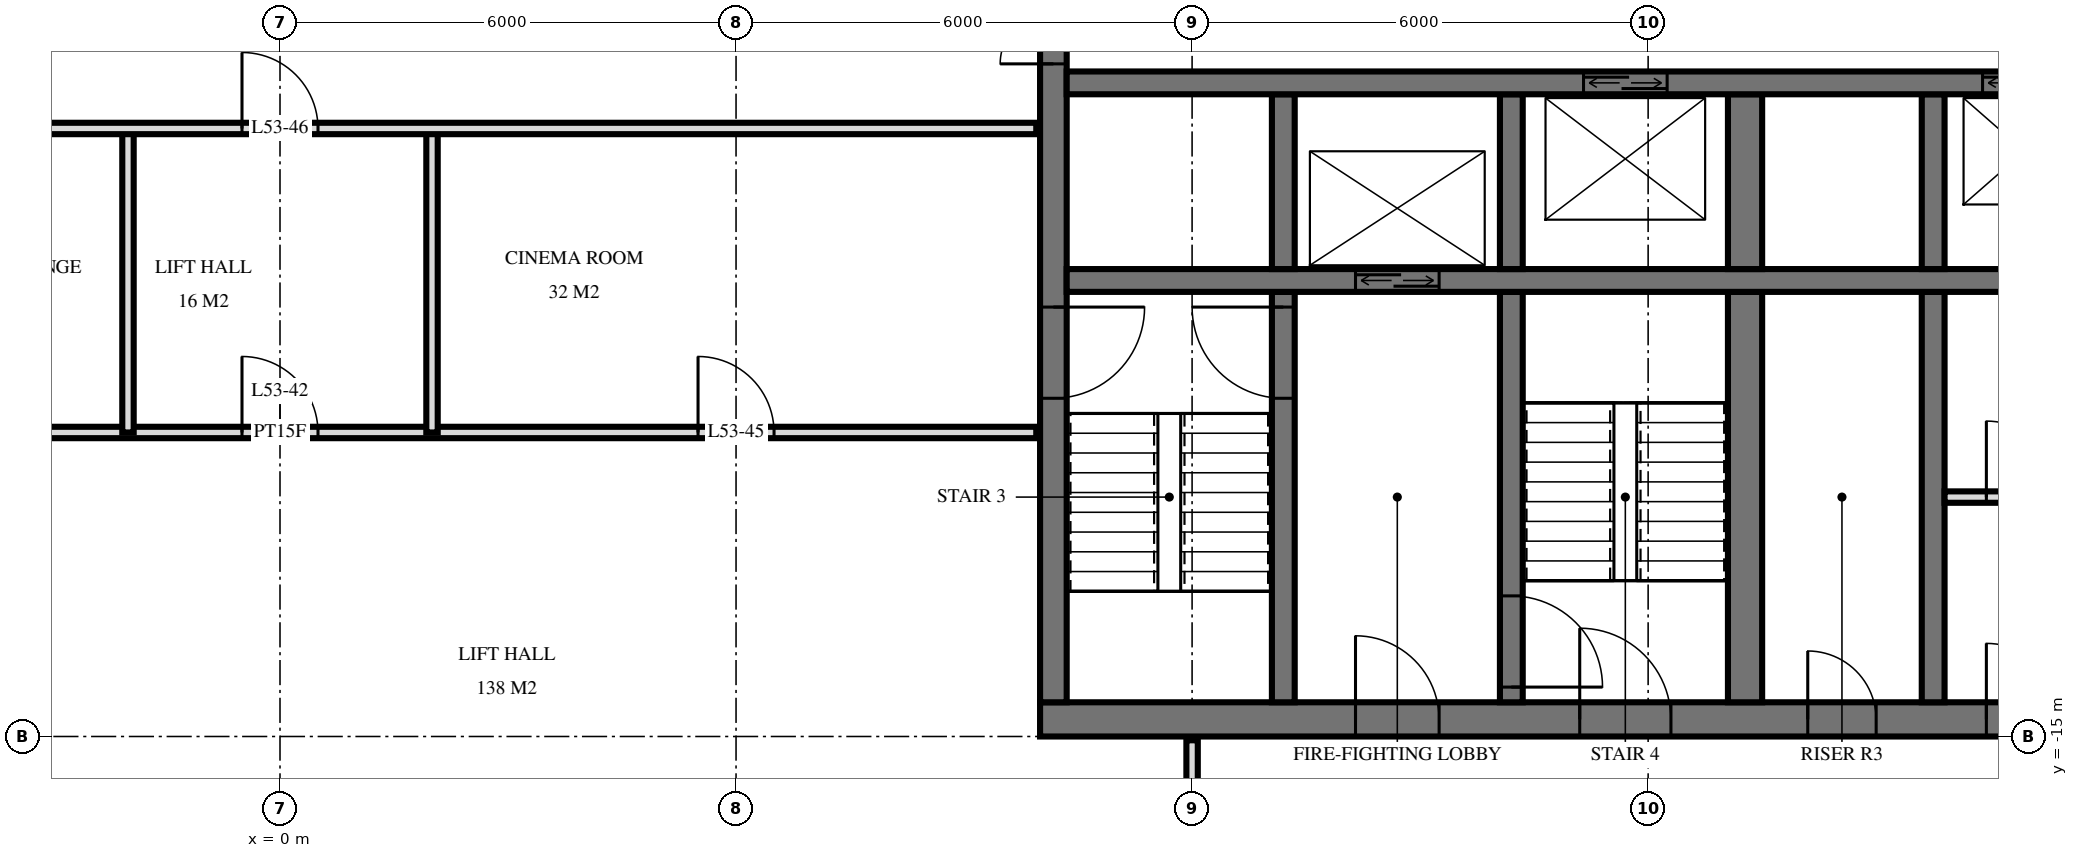
"""IFC4 building model, lengths in metres.
Left out: names, types, materials, properties, quantities, classifications, styles, units other than length and angle.
Written with IfcOpenShell. Run it as: python <this file> out.ifc"""

import sys

from ifc_helpers import new_model, si_unit, direction, frame, frame_2d, origin, place, context, subcontext, project, spatial, rectangle, extrude, element, fill, save


model = new_model("IFC4")
c1 = context("Model", 3, precision=1e-05, world=origin(), true_north=direction((0.0, 1.0)))
c2 = subcontext(c1, "Body", "Model", "MODEL_VIEW")
j1 = project(units=[si_unit("LENGTHUNIT", "METRE"), si_unit("PLANEANGLEUNIT", "RADIAN")], contexts=[c1])
p1 = place(None, origin())
s1 = spatial("IfcSite", under=j1, at=p1, CompositionType="ELEMENT")
p2 = place(p1, origin())
s2 = spatial("IfcBuilding", under=s1, at=p2, CompositionType="ELEMENT")
p3 = place(p2, frame((0.0, 0.0, 204.6)))
s3 = spatial("IfcBuildingStorey", under=s2, at=p3, CompositionType="ELEMENT", Elevation=204.6)
p4 = place(p3, frame((10.0, -14.775, 0.0), z_axis=(0.0, 0.0, 1.0), x_axis=(1.0, 0.0, 0.0)))
e1 = element("IfcWall", 1, at=p4, inside=s3, PredefinedType="SHEAR", context=c2, shape_type="SweptSolid", body=[
    extrude(rectangle(XDim=14.5, YDim=0.45, at=frame_2d((7.25, 0.0))), origin(), (0.0, 0.0, 1.0), 3.5),
])
p5 = place(p4, frame((7.1, 0.0, 0.0)))
e2 = element("IfcOpeningElement", 2, at=p5, cuts=e1, PredefinedType="OPENING", context=c2, shape_type="SweptSolid", body=[
    extrude(rectangle(XDim=1.2, YDim=2.1, at=frame_2d((0.6, 1.05))), frame((0.0, 0.235, 0.0), z_axis=(0.0, -1.0, 0.0), x_axis=(1.0, 0.0, 0.0)), (0.0, 0.0, 1.0), 0.47),
])
p6 = place(p4, frame((4.15, 0.0, 0.0)))
e3 = element("IfcOpeningElement", 3, at=p6, cuts=e1, PredefinedType="OPENING", context=c2, shape_type="SweptSolid", body=[
    extrude(rectangle(XDim=1.1, YDim=2.1, at=frame_2d((0.55, 1.05))), frame((0.0, 0.235, 0.0), z_axis=(0.0, -1.0, 0.0), x_axis=(1.0, 0.0, 0.0)), (0.0, 0.0, 1.0), 0.47),
])
p7 = place(p4, frame((10.1, 0.0, 0.0)))
e4 = element("IfcOpeningElement", 4, at=p7, cuts=e1, PredefinedType="OPENING", context=c2, shape_type="SweptSolid", body=[
    extrude(rectangle(XDim=0.9, YDim=2.1, at=frame_2d((0.45, 1.05))), frame((0.0, 0.235, 0.0), z_axis=(0.0, -1.0, 0.0), x_axis=(1.0, 0.0, 0.0)), (0.0, 0.0, 1.0), 0.47),
])
p8 = place(p4, frame((12.45, 0.0, 0.0)))
e5 = element("IfcOpeningElement", 5, at=p8, cuts=e1, PredefinedType="OPENING", context=c2, shape_type="SweptSolid", body=[
    extrude(rectangle(XDim=1.0, YDim=2.1, at=frame_2d((0.5, 1.05))), frame((0.0, 0.235, 0.0), z_axis=(0.0, -1.0, 0.0), x_axis=(1.0, 0.0, 0.0)), (0.0, 0.0, 1.0), 0.47),
])
p9 = place(p3, frame((10.175, -14.55, 0.0), z_axis=(0.0, 0.0, 1.0), x_axis=(0.0, 1.0, 0.0)))
e6 = element("IfcWall", 6, at=p9, inside=s3, PredefinedType="SHEAR", context=c2, shape_type="SweptSolid", body=[
    extrude(rectangle(XDim=14.1, YDim=0.35, at=frame_2d((7.05, 0.0))), origin(), (0.0, 0.0, 1.0), 3.5),
])
p10 = place(p9, frame((8.4, 0.0, 0.0)))
e7 = element("IfcOpeningElement", 7, at=p10, cuts=e6, PredefinedType="OPENING", context=c2, shape_type="SweptSolid", body=[
    extrude(rectangle(XDim=1.4, YDim=2.4, at=frame_2d((0.7, 1.2))), frame((0.0, 0.185, 0.0), z_axis=(0.0, -1.0, 0.0), x_axis=(1.0, 0.0, 0.0)), (0.0, 0.0, 1.0), 0.37),
])
p11 = place(p9, frame((10.0, 0.0, 0.0)))
e8 = element("IfcOpeningElement", 8, at=p11, cuts=e6, PredefinedType="OPENING", context=c2, shape_type="SweptSolid", body=[
    extrude(rectangle(XDim=1.4, YDim=2.4, at=frame_2d((0.7, 1.2))), frame((0.0, 0.185, 0.0), z_axis=(0.0, -1.0, 0.0), x_axis=(1.0, 0.0, 0.0)), (0.0, 0.0, 1.0), 0.37),
])
p12 = place(p9, frame((4.0, 0.0, 0.0)))
e9 = element("IfcOpeningElement", 9, at=p12, cuts=e6, PredefinedType="OPENING", context=c2, shape_type="SweptSolid", body=[
    extrude(rectangle(XDim=1.2, YDim=2.1, at=frame_2d((0.6, 1.05))), frame((0.0, 0.185, 0.0), z_axis=(0.0, -1.0, 0.0), x_axis=(1.0, 0.0, 0.0)), (0.0, 0.0, 1.0), 0.37),
])
p13 = place(p3, frame((10.35, -6.4, 0.0), z_axis=(0.0, 0.0, 1.0), x_axis=(1.0, 0.0, 0.0)))
e10 = element("IfcWall", 10, at=p13, inside=s3, PredefinedType="SHEAR", context=c2, shape_type="SweptSolid", body=[
    extrude(rectangle(XDim=13.7, YDim=0.3, at=frame_2d((6.85, 0.0))), origin(), (0.0, 0.0, 1.0), 3.5),
])
p14 = place(p13, frame((12.05, 0.0, 0.0)))
e11 = element("IfcOpeningElement", 11, at=p14, cuts=e10, PredefinedType="OPENING", context=c2, shape_type="SweptSolid", body=[
    extrude(rectangle(XDim=1.1, YDim=2.1, at=frame_2d((0.55, 1.05))), frame((0.0, 0.16, 0.0), z_axis=(0.0, -1.0, 0.0), x_axis=(1.0, 0.0, 0.0)), (0.0, 0.0, 1.0), 0.32),
])
p15 = place(p13, frame((6.8, 0.0, 0.0)))
e12 = element("IfcOpeningElement", 12, at=p15, cuts=e10, PredefinedType="OPENING", context=c2, shape_type="SweptSolid", body=[
    extrude(rectangle(XDim=1.1, YDim=2.1, at=frame_2d((0.55, 1.05))), frame((0.0, 0.16, 0.0), z_axis=(0.0, -1.0, 0.0), x_axis=(1.0, 0.0, 0.0)), (0.0, 0.0, 1.0), 0.32),
])
p16 = place(p3, frame((10.35, -9.0, 0.0), z_axis=(0.0, 0.0, 1.0), x_axis=(1.0, 0.0, 0.0)))
e13 = element("IfcWall", 13, at=p16, inside=s3, PredefinedType="SHEAR", context=c2, shape_type="SweptSolid", body=[
    extrude(rectangle(XDim=13.7, YDim=0.3, at=frame_2d((6.85, 0.0))), origin(), (0.0, 0.0, 1.0), 3.5),
])
p17 = place(p16, frame((3.8, 0.0, 0.0)))
e14 = element("IfcOpeningElement", 14, at=p17, cuts=e13, PredefinedType="OPENING", context=c2, shape_type="SweptSolid", body=[
    extrude(rectangle(XDim=1.1, YDim=2.1, at=frame_2d((0.55, 1.05))), frame((0.0, 0.16, 0.0), z_axis=(0.0, -1.0, 0.0), x_axis=(1.0, 0.0, 0.0)), (0.0, 0.0, 1.0), 0.32),
])
p18 = place(p3, frame((13.2, -8.85, 0.0), z_axis=(0.0, 0.0, 1.0), x_axis=(0.0, 1.0, 0.0)))
e15 = element("IfcWall", 15, at=p18, inside=s3, PredefinedType="SHEAR", context=c2, shape_type="SweptSolid", body=[
    extrude(rectangle(XDim=2.3, YDim=0.3, at=frame_2d((1.15, 0.0))), origin(), (0.0, 0.0, 1.0), 3.5),
])
p19 = place(p3, frame((13.2, -14.55, 0.0), z_axis=(0.0, 0.0, 1.0), x_axis=(0.0, 1.0, 0.0)))
e16 = element("IfcWall", 16, at=p19, inside=s3, PredefinedType="SHEAR", context=c2, shape_type="SweptSolid", body=[
    extrude(rectangle(XDim=5.4, YDim=0.3, at=frame_2d((2.7, 0.0))), origin(), (0.0, 0.0, 1.0), 3.5),
])
p20 = place(p19, frame((4.0, 0.0, 0.0)))
e17 = element("IfcOpeningElement", 17, at=p20, cuts=e16, PredefinedType="OPENING", context=c2, shape_type="SweptSolid", body=[
    extrude(rectangle(XDim=1.2, YDim=2.1, at=frame_2d((0.6, 1.05))), frame((0.0, 0.16, 0.0), z_axis=(0.0, -1.0, 0.0), x_axis=(1.0, 0.0, 0.0)), (0.0, 0.0, 1.0), 0.32),
])
p21 = place(p3, frame((16.2, -8.85, 0.0), z_axis=(0.0, 0.0, 1.0), x_axis=(0.0, 1.0, 0.0)))
e18 = element("IfcWall", 18, at=p21, inside=s3, PredefinedType="SHEAR", context=c2, shape_type="SweptSolid", body=[
    extrude(rectangle(XDim=2.3, YDim=0.3, at=frame_2d((1.15, 0.0))), origin(), (0.0, 0.0, 1.0), 3.5),
])
p22 = place(p3, frame((16.2, -14.55, 0.0), z_axis=(0.0, 0.0, 1.0), x_axis=(0.0, 1.0, 0.0)))
e19 = element("IfcWall", 19, at=p22, inside=s3, PredefinedType="SHEAR", context=c2, shape_type="SweptSolid", body=[
    extrude(rectangle(XDim=5.4, YDim=0.3, at=frame_2d((2.7, 0.0))), origin(), (0.0, 0.0, 1.0), 3.5),
])
p23 = place(p22, frame((0.2, 0.0, 0.0)))
e20 = element("IfcOpeningElement", 20, at=p23, cuts=e19, PredefinedType="OPENING", context=c2, shape_type="SweptSolid", body=[
    extrude(rectangle(XDim=1.2, YDim=2.1, at=frame_2d((0.6, 1.05))), frame((0.0, 0.16, 0.0), z_axis=(0.0, -1.0, 0.0), x_axis=(1.0, 0.0, 0.0)), (0.0, 0.0, 1.0), 0.32),
])
p24 = place(p3, frame((19.275, -8.85, 0.0), z_axis=(0.0, 0.0, 1.0), x_axis=(0.0, 1.0, 0.0)))
e21 = element("IfcWall", 21, at=p24, inside=s3, PredefinedType="SHEAR", context=c2, shape_type="SweptSolid", body=[
    extrude(rectangle(XDim=2.3, YDim=0.45, at=frame_2d((1.15, 0.0))), origin(), (0.0, 0.0, 1.0), 3.5),
])
p25 = place(p3, frame((19.275, -14.55, 0.0), z_axis=(0.0, 0.0, 1.0), x_axis=(0.0, 1.0, 0.0)))
e22 = element("IfcWall", 22, at=p25, inside=s3, PredefinedType="SHEAR", context=c2, shape_type="SweptSolid", body=[
    extrude(rectangle(XDim=5.4, YDim=0.45, at=frame_2d((2.7, 0.0))), origin(), (0.0, 0.0, 1.0), 3.5),
])
p26 = place(p3, frame((21.75, -8.85, 0.0), z_axis=(0.0, 0.0, 1.0), x_axis=(0.0, 1.0, 0.0)))
e23 = element("IfcWall", 23, at=p26, inside=s3, PredefinedType="SHEAR", context=c2, shape_type="SweptSolid", body=[
    extrude(rectangle(XDim=2.3, YDim=0.3, at=frame_2d((1.15, 0.0))), origin(), (0.0, 0.0, 1.0), 3.5),
])
p27 = place(p3, frame((21.75, -14.55, 0.0), z_axis=(0.0, 0.0, 1.0), x_axis=(0.0, 1.0, 0.0)))
e24 = element("IfcWall", 24, at=p27, inside=s3, PredefinedType="SHEAR", context=c2, shape_type="SweptSolid", body=[
    extrude(rectangle(XDim=5.4, YDim=0.3, at=frame_2d((2.7, 0.0))), origin(), (0.0, 0.0, 1.0), 3.5),
])
p28 = place(p3, frame((21.9, -11.85, 0.0), z_axis=(0.0, 0.0, 1.0), x_axis=(1.0, 0.0, 0.0)))
e25 = element("IfcWall", 25, at=p28, inside=s3, PredefinedType="PARTITIONING", context=c2, shape_type="SweptSolid", body=[
    extrude(rectangle(XDim=2.1, YDim=0.15, at=frame_2d((1.05, 0.0))), origin(), (0.0, 0.0, 1.0), 3.2),
])
p29 = place(p28, frame((0.55, 0.0, 0.0)))
e26 = element("IfcOpeningElement", 26, at=p29, cuts=e25, PredefinedType="OPENING", context=c2, shape_type="SweptSolid", body=[
    extrude(rectangle(XDim=1.0, YDim=2.1, at=frame_2d((0.5, 1.05))), frame((0.0, 0.085, 0.0), z_axis=(0.0, -1.0, 0.0), x_axis=(1.0, 0.0, 0.0)), (0.0, 0.0, 1.0), 0.17),
])
p30 = place(p3, frame((12.0, -17.4, 0.0), z_axis=(0.0, 0.0, 1.0), x_axis=(0.0, 1.0, 0.0)))
e27 = element("IfcWall", 27, at=p30, inside=s3, PredefinedType="PARTITIONING", context=c2, shape_type="SweptSolid", body=[
    extrude(rectangle(XDim=2.35, YDim=0.15, at=frame_2d((1.175, 0.0))), origin(), (0.0, 0.0, 1.0), 3.22),
])
p31 = place(p30, frame((0.7, 0.0, 0.0)))
e28 = element("IfcOpeningElement", 28, at=p31, cuts=e27, PredefinedType="OPENING", context=c2, shape_type="SweptSolid", body=[
    extrude(rectangle(XDim=1.0, YDim=2.1, at=frame_2d((0.5, 1.05))), frame((0.0, 0.085, 0.0), z_axis=(0.0, -1.0, 0.0), x_axis=(1.0, 0.0, 0.0)), (0.0, 0.0, 1.0), 0.17),
])
for number, where, z_axis, x_axis in (
    (29, (2.0, -11.0, 0.0), (0.0, 0.0, 1.0), (0.0, 1.0, 0.0)),
    (30, (-2.0, -11.0, 0.0), (0.0, 0.0, 1.0), (0.0, 1.0, 0.0)),
):
    element("IfcWall", number, at=place(p3, frame(where, z_axis=z_axis, x_axis=x_axis)), inside=s3, PredefinedType="PARTITIONING", context=c2, shape_type="SweptSolid", body=[
        extrude(rectangle(XDim=4.0, YDim=0.15, at=frame_2d((2.0, 0.0))), origin(), (0.0, 0.0, 1.0), 3.22),
    ])
p32 = place(p3, frame((-9.95, -11.0, 0.0), z_axis=(0.0, 0.0, 1.0), x_axis=(1.0, 0.0, 0.0)))
e31 = element("IfcWall", 31, at=p32, inside=s3, PredefinedType="PARTITIONING", context=c2, shape_type="SweptSolid", body=[
    extrude(rectangle(XDim=19.9, YDim=0.15, at=frame_2d((9.95, 0.0))), origin(), (0.0, 0.0, 1.0), 3.22),
])
p33 = place(p32, frame((9.45, 0.0, 0.0)))
e32 = element("IfcOpeningElement", 32, at=p33, cuts=e31, PredefinedType="OPENING", context=c2, shape_type="SweptSolid", body=[
    extrude(rectangle(XDim=1.0, YDim=2.1, at=frame_2d((0.5, 1.05))), frame((0.0, 0.085, 0.0), z_axis=(0.0, -1.0, 0.0), x_axis=(1.0, 0.0, 0.0)), (0.0, 0.0, 1.0), 0.17),
])
p34 = place(p32, frame((15.45, 0.0, 0.0)))
e33 = element("IfcOpeningElement", 33, at=p34, cuts=e31, PredefinedType="OPENING", context=c2, shape_type="SweptSolid", body=[
    extrude(rectangle(XDim=1.0, YDim=2.1, at=frame_2d((0.5, 1.05))), frame((0.0, 0.085, 0.0), z_axis=(0.0, -1.0, 0.0), x_axis=(1.0, 0.0, 0.0)), (0.0, 0.0, 1.0), 0.17),
])
p35 = place(p3, frame((-9.95, -7.0, 0.0), z_axis=(0.0, 0.0, 1.0), x_axis=(1.0, 0.0, 0.0)))
e34 = element("IfcWall", 34, at=p35, inside=s3, PredefinedType="PARTITIONING", context=c2, shape_type="SweptSolid", body=[
    extrude(rectangle(XDim=19.9, YDim=0.15, at=frame_2d((9.95, 0.0))), origin(), (0.0, 0.0, 1.0), 3.22),
])
p36 = place(p35, frame((9.45, 0.0, 0.0)))
e35 = element("IfcOpeningElement", 35, at=p36, cuts=e34, PredefinedType="OPENING", context=c2, shape_type="SweptSolid", body=[
    extrude(rectangle(XDim=1.0, YDim=2.1, at=frame_2d((0.5, 1.05))), frame((0.0, 0.085, 0.0), z_axis=(0.0, -1.0, 0.0), x_axis=(1.0, 0.0, 0.0)), (0.0, 0.0, 1.0), 0.17),
])
p37 = place(p35, frame((3.45, 0.0, 0.0)))
e36 = element("IfcOpeningElement", 36, at=p37, cuts=e34, PredefinedType="OPENING", context=c2, shape_type="SweptSolid", body=[
    extrude(rectangle(XDim=1.0, YDim=2.1, at=frame_2d((0.5, 1.05))), frame((0.0, 0.085, 0.0), z_axis=(0.0, -1.0, 0.0), x_axis=(1.0, 0.0, 0.0)), (0.0, 0.0, 1.0), 0.17),
])
p38 = place(p14, origin())
e37 = element("IfcDoor", 37, at=p38, inside=s3, OperationType="DOUBLE_DOOR_SLIDING", PredefinedType="USERDEFINED", context=c2, shape_type="SweptSolid", body=[
    extrude(rectangle(XDim=1.1, YDim=2.1, at=frame_2d((0.55, 1.05))), frame((0.0, 0.025, 0.0), z_axis=(0.0, -1.0, 0.0), x_axis=(1.0, 0.0, 0.0)), (0.0, 0.0, 1.0), 0.05),
])
fill(e11, e37)
p39 = place(p17, origin())
e38 = element("IfcDoor", 38, at=p39, inside=s3, OperationType="DOUBLE_DOOR_SLIDING", PredefinedType="USERDEFINED", context=c2, shape_type="SweptSolid", body=[
    extrude(rectangle(XDim=1.1, YDim=2.1, at=frame_2d((0.55, 1.05))), frame((0.0, 0.025, 0.0), z_axis=(0.0, -1.0, 0.0), x_axis=(1.0, 0.0, 0.0)), (0.0, 0.0, 1.0), 0.05),
])
fill(e14, e38)
p40 = place(p15, origin())
e39 = element("IfcDoor", 39, at=p40, inside=s3, OperationType="DOUBLE_DOOR_SLIDING", PredefinedType="USERDEFINED", context=c2, shape_type="SweptSolid", body=[
    extrude(rectangle(XDim=1.1, YDim=2.1, at=frame_2d((0.55, 1.05))), frame((0.0, 0.025, 0.0), z_axis=(0.0, -1.0, 0.0), x_axis=(1.0, 0.0, 0.0)), (0.0, 0.0, 1.0), 0.05),
])
fill(e12, e39)
p41 = place(p10, origin())
e40 = element("IfcDoor", 40, at=p41, inside=s3, OperationType="DOUBLE_DOOR_SINGLE_SWING", PredefinedType="DOOR", context=c2, shape_type="SweptSolid", body=[
    extrude(rectangle(XDim=1.4, YDim=2.4, at=frame_2d((0.7, 1.2))), frame((0.0, 0.025, 0.0), z_axis=(0.0, -1.0, 0.0), x_axis=(1.0, 0.0, 0.0)), (0.0, 0.0, 1.0), 0.05),
])
fill(e7, e40)
p42 = place(p12, frame((0.6, 0.0, 0.0), z_axis=(0.0, 0.0, 1.0), x_axis=(-1.0, 0.0, 0.0)))
e41 = element("IfcDoor", 41, at=p42, inside=s3, OperationType="SINGLE_SWING_RIGHT", PredefinedType="DOOR", context=c2, shape_type="SweptSolid", body=[
    extrude(rectangle(XDim=1.2, YDim=2.1, at=frame_2d((0.0, 1.05))), frame((0.0, -0.025, 0.0), z_axis=(0.0, 1.0, 0.0), x_axis=(-1.0, 0.0, 0.0)), (0.0, 0.0, 1.0), 0.05),
])
fill(e9, e41)
p43 = place(p5, origin())
e42 = element("IfcDoor", 42, at=p43, inside=s3, OperationType="SINGLE_SWING_RIGHT", PredefinedType="DOOR", context=c2, shape_type="SweptSolid", body=[
    extrude(rectangle(XDim=1.2, YDim=2.1, at=frame_2d((0.6, 1.05))), frame((0.0, 0.025, 0.0), z_axis=(0.0, -1.0, 0.0), x_axis=(1.0, 0.0, 0.0)), (0.0, 0.0, 1.0), 0.05),
])
fill(e2, e42)
p44 = place(p6, origin())
e43 = element("IfcDoor", 43, at=p44, inside=s3, OperationType="SINGLE_SWING_RIGHT", PredefinedType="DOOR", context=c2, shape_type="SweptSolid", body=[
    extrude(rectangle(XDim=1.1, YDim=2.1, at=frame_2d((0.55, 1.05))), frame((0.0, 0.025, 0.0), z_axis=(0.0, -1.0, 0.0), x_axis=(1.0, 0.0, 0.0)), (0.0, 0.0, 1.0), 0.05),
])
fill(e3, e43)
p45 = place(p7, origin())
e44 = element("IfcDoor", 44, at=p45, inside=s3, OperationType="SINGLE_SWING_RIGHT", PredefinedType="DOOR", context=c2, shape_type="SweptSolid", body=[
    extrude(rectangle(XDim=0.9, YDim=2.1, at=frame_2d((0.45, 1.05))), frame((0.0, 0.025, 0.0), z_axis=(0.0, -1.0, 0.0), x_axis=(1.0, 0.0, 0.0)), (0.0, 0.0, 1.0), 0.05),
])
fill(e4, e44)
p46 = place(p8, origin())
e45 = element("IfcDoor", 45, at=p46, inside=s3, OperationType="SINGLE_SWING_RIGHT", PredefinedType="DOOR", context=c2, shape_type="SweptSolid", body=[
    extrude(rectangle(XDim=1.0, YDim=2.1, at=frame_2d((0.5, 1.05))), frame((0.0, 0.025, 0.0), z_axis=(0.0, -1.0, 0.0), x_axis=(1.0, 0.0, 0.0)), (0.0, 0.0, 1.0), 0.05),
])
fill(e5, e45)
p47 = place(p20, origin())
e46 = element("IfcDoor", 46, at=p47, inside=s3, OperationType="SINGLE_SWING_LEFT", PredefinedType="DOOR", context=c2, shape_type="SweptSolid", body=[
    extrude(rectangle(XDim=1.2, YDim=2.1, at=frame_2d((0.6, 1.05))), frame((0.0, 0.025, 0.0), z_axis=(0.0, -1.0, 0.0), x_axis=(1.0, 0.0, 0.0)), (0.0, 0.0, 1.0), 0.05),
])
fill(e17, e46)
p48 = place(p23, frame((0.6, 0.0, 0.0), z_axis=(0.0, 0.0, 1.0), x_axis=(-1.0, 0.0, 0.0)))
e47 = element("IfcDoor", 47, at=p48, inside=s3, OperationType="SINGLE_SWING_LEFT", PredefinedType="DOOR", context=c2, shape_type="SweptSolid", body=[
    extrude(rectangle(XDim=1.2, YDim=2.1, at=frame_2d((0.0, 1.05))), frame((0.0, -0.025, 0.0), z_axis=(0.0, 1.0, 0.0), x_axis=(-1.0, 0.0, 0.0)), (0.0, 0.0, 1.0), 0.05),
])
fill(e20, e47)
p49 = place(p29, origin())
e48 = element("IfcDoor", 48, at=p49, inside=s3, OperationType="SINGLE_SWING_RIGHT", PredefinedType="DOOR", context=c2, shape_type="SweptSolid", body=[
    extrude(rectangle(XDim=1.0, YDim=2.1, at=frame_2d((0.5, 1.05))), frame((0.0, 0.025, 0.0), z_axis=(0.0, -1.0, 0.0), x_axis=(1.0, 0.0, 0.0)), (0.0, 0.0, 1.0), 0.05),
])
fill(e26, e48)
p50 = place(p33, origin())
e49 = element("IfcDoor", 49, at=p50, inside=s3, OperationType="SINGLE_SWING_RIGHT", PredefinedType="DOOR", context=c2, shape_type="SweptSolid", body=[
    extrude(rectangle(XDim=1.0, YDim=2.1, at=frame_2d((0.5, 1.05))), frame((0.0, 0.025, 0.0), z_axis=(0.0, -1.0, 0.0), x_axis=(1.0, 0.0, 0.0)), (0.0, 0.0, 1.0), 0.05),
])
fill(e32, e49)
p51 = place(p34, origin())
e50 = element("IfcDoor", 50, at=p51, inside=s3, OperationType="SINGLE_SWING_RIGHT", PredefinedType="DOOR", context=c2, shape_type="SweptSolid", body=[
    extrude(rectangle(XDim=1.0, YDim=2.1, at=frame_2d((0.5, 1.05))), frame((0.0, 0.025, 0.0), z_axis=(0.0, -1.0, 0.0), x_axis=(1.0, 0.0, 0.0)), (0.0, 0.0, 1.0), 0.05),
])
fill(e33, e50)
p52 = place(p36, origin())
e51 = element("IfcDoor", 51, at=p52, inside=s3, OperationType="SINGLE_SWING_RIGHT", PredefinedType="DOOR", context=c2, shape_type="SweptSolid", body=[
    extrude(rectangle(XDim=1.0, YDim=2.1, at=frame_2d((0.5, 1.05))), frame((0.0, 0.025, 0.0), z_axis=(0.0, -1.0, 0.0), x_axis=(1.0, 0.0, 0.0)), (0.0, 0.0, 1.0), 0.05),
])
fill(e35, e51)
save(model, sys.argv[1])
